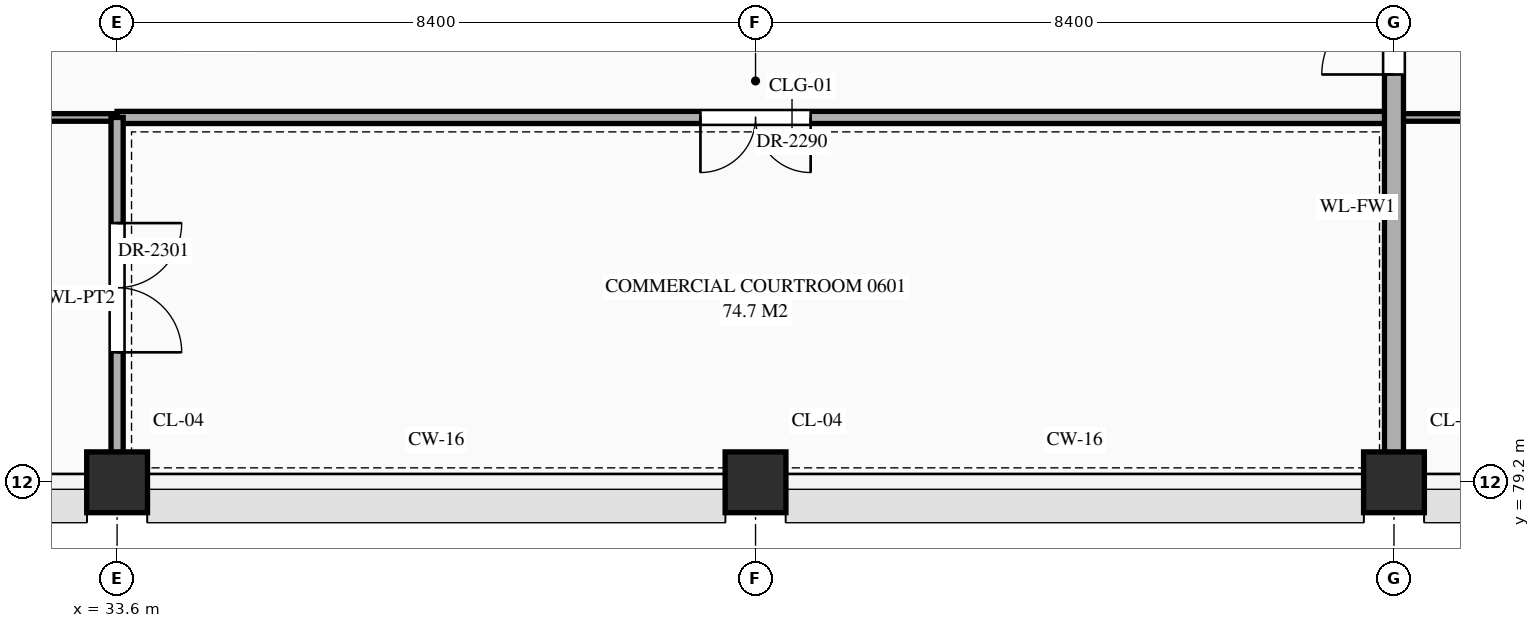
"""IFC4 building model, lengths in metres.
Left out: names, types, materials, properties, quantities, classifications, styles, units other than length and angle.
Written with IfcOpenShell. Run it as: python <this file> out.ifc"""

import sys

from ifc_helpers import new_model, si_unit, direction, frame, frame_2d, origin, origin_2d, place, context, subcontext, project, spatial, rectangle, extrude, element, fill, save


model = new_model("IFC4")
c1 = context("Model", 3, precision=1e-05, world=origin(), true_north=direction((0.0, 1.0)))
c2 = subcontext(c1, "Body", "Model", "MODEL_VIEW")
j1 = project(units=[si_unit("LENGTHUNIT", "METRE"), si_unit("PLANEANGLEUNIT", "RADIAN")], contexts=[c1])
p1 = place(None, origin())
s1 = spatial("IfcSite", under=j1, at=p1, CompositionType="ELEMENT")
p2 = place(p1, origin())
s2 = spatial("IfcBuilding", under=s1, at=p2, CompositionType="ELEMENT")
p3 = place(p2, frame((0.0, 0.0, 26.1)))
s3 = spatial("IfcBuildingStorey", under=s2, at=p3, CompositionType="ELEMENT", Elevation=26.1)
for number, where, z_axis, x_axis in (
    (1, (33.6, 79.2, 0.0), (0.0, 0.0, 1.0), (1.0, 0.0, 0.0)),
    (2, (42.0, 79.2, 0.0), (0.0, 0.0, 1.0), (1.0, 0.0, 0.0)),
    (3, (50.4, 79.2, 0.0), (0.0, 0.0, 1.0), (1.0, 0.0, 0.0)),
):
    element("IfcColumn", number, at=place(p3, frame(where, z_axis=z_axis, x_axis=x_axis)), inside=s3, PredefinedType="COLUMN", context=c2, shape_type="SweptSolid", body=[
        extrude(rectangle(XDim=0.8, YDim=0.8, at=origin_2d()), origin(), (0.0, 0.0, 1.0), 4.5),
    ])
p4 = place(p3, frame((25.24, 84.0, 0.0), z_axis=(0.0, 0.0, 1.0), x_axis=(1.0, 0.0, 0.0)))
e4 = element("IfcWall", 4, at=p4, inside=s3, PredefinedType="STANDARD", context=c2, shape_type="SweptSolid", body=[
    extrude(rectangle(XDim=8.36, YDim=0.1, at=frame_2d((4.18, 0.0))), origin(), (0.0, 0.0, 1.0), 4.24),
])
p5 = place(p4, frame((3.33, 0.0, 0.0)))
e5 = element("IfcOpeningElement", 5, at=p5, cuts=e4, PredefinedType="OPENING", context=c2, shape_type="SweptSolid", body=[
    extrude(rectangle(XDim=1.7, YDim=2.45, at=frame_2d((0.85, 1.225))), frame((0.0, 0.062, 0.0), z_axis=(0.0, -1.0, 0.0), x_axis=(1.0, 0.0, 0.0)), (0.0, 0.0, 1.0), 0.124),
])
p6 = place(p3, frame((33.6, 84.0, 0.0), z_axis=(0.0, 0.0, 1.0), x_axis=(1.0, 0.0, 0.0)))
e6 = element("IfcWall", 6, at=p6, inside=s3, PredefinedType="STANDARD", context=c2, shape_type="SweptSolid", body=[
    extrude(rectangle(XDim=16.8, YDim=0.16, at=frame_2d((8.4, 0.0))), origin(), (0.0, 0.0, 1.0), 4.24),
])
p7 = place(p6, frame((7.675, 0.0, 0.0)))
e7 = element("IfcOpeningElement", 7, at=p7, cuts=e6, PredefinedType="OPENING", context=c2, shape_type="SweptSolid", body=[
    extrude(rectangle(XDim=1.45, YDim=2.3, at=frame_2d((0.725, 1.15))), frame((0.0, 0.092, 0.0), z_axis=(0.0, -1.0, 0.0), x_axis=(1.0, 0.0, 0.0)), (0.0, 0.0, 1.0), 0.184),
])
p8 = place(p3, frame((50.4, 84.0, 0.0), z_axis=(0.0, 0.0, 1.0), x_axis=(1.0, 0.0, 0.0)))
e8 = element("IfcWall", 8, at=p8, inside=s3, PredefinedType="STANDARD", context=c2, shape_type="SweptSolid", body=[
    extrude(rectangle(XDim=16.8, YDim=0.1, at=frame_2d((8.4, 0.0))), origin(), (0.0, 0.0, 1.0), 4.24),
])
p9 = place(p8, frame((3.72, 0.0, 0.0)))
e9 = element("IfcOpeningElement", 9, at=p9, cuts=e8, PredefinedType="OPENING", context=c2, shape_type="SweptSolid", body=[
    extrude(rectangle(XDim=0.96, YDim=2.2, at=frame_2d((0.48, 1.1))), frame((0.0, 0.062, 0.0), z_axis=(0.0, -1.0, 0.0), x_axis=(1.0, 0.0, 0.0)), (0.0, 0.0, 1.0), 0.124),
])
p10 = place(p8, frame((12.1, 0.0, 0.0)))
e10 = element("IfcOpeningElement", 10, at=p10, cuts=e8, PredefinedType="OPENING", context=c2, shape_type="SweptSolid", body=[
    extrude(rectangle(XDim=1.0, YDim=2.25, at=frame_2d((0.5, 1.125))), frame((0.0, 0.062, 0.0), z_axis=(0.0, -1.0, 0.0), x_axis=(1.0, 0.0, 0.0)), (0.0, 0.0, 1.0), 0.124),
])
p11 = place(p3, frame((33.6, 79.24, 0.0), z_axis=(0.0, 0.0, 1.0), x_axis=(0.0, 1.0, 0.0)))
e11 = element("IfcWall", 11, at=p11, inside=s3, PredefinedType="STANDARD", context=c2, shape_type="SweptSolid", body=[
    extrude(rectangle(XDim=4.76, YDim=0.16, at=frame_2d((2.38, 0.0))), origin(), (0.0, 0.0, 1.0), 4.24),
])
p12 = place(p11, frame((1.67, 0.0, 0.0)))
e12 = element("IfcOpeningElement", 12, at=p12, cuts=e11, PredefinedType="OPENING", context=c2, shape_type="SweptSolid", body=[
    extrude(rectangle(XDim=1.7, YDim=2.45, at=frame_2d((0.85, 1.225))), frame((0.0, 0.092, 0.0), z_axis=(0.0, -1.0, 0.0), x_axis=(1.0, 0.0, 0.0)), (0.0, 0.0, 1.0), 0.184),
])
p13 = place(p3, frame((50.4, 79.24, 0.0), z_axis=(0.0, 0.0, 1.0), x_axis=(0.0, 1.0, 0.0)))
e13 = element("IfcWall", 13, at=p13, inside=s3, PredefinedType="STANDARD", context=c2, shape_type="SweptSolid", body=[
    extrude(rectangle(XDim=7.16, YDim=0.25, at=frame_2d((3.58, 0.0))), origin(), (0.0, 0.0, 1.0), 3.49),
])
p14 = place(p13, frame((5.325, 0.0, 0.0)))
e14 = element("IfcOpeningElement", 14, at=p14, cuts=e13, PredefinedType="OPENING", context=c2, shape_type="SweptSolid", body=[
    extrude(rectangle(XDim=0.95, YDim=2.15, at=frame_2d((0.475, 1.075))), frame((0.0, 0.137, 0.0), z_axis=(0.0, -1.0, 0.0), x_axis=(1.0, 0.0, 0.0)), (0.0, 0.0, 1.0), 0.274),
])
p15 = place(p14, origin())
e15 = element("IfcDoor", 15, at=p15, inside=s3, OperationType="SINGLE_SWING_LEFT", PredefinedType="DOOR", context=c2, shape_type="SweptSolid", body=[
    extrude(rectangle(XDim=0.95, YDim=2.15, at=frame_2d((0.475, 1.075))), frame((0.0, 0.025, 0.0), z_axis=(0.0, -1.0, 0.0), x_axis=(1.0, 0.0, 0.0)), (0.0, 0.0, 1.0), 0.05),
])
fill(e14, e15)
p16 = place(p7, frame((1.45, 0.0, 0.0), z_axis=(0.0, 0.0, 1.0), x_axis=(-1.0, 0.0, 0.0)))
e16 = element("IfcDoor", 16, at=p16, inside=s3, OperationType="DOUBLE_DOOR_SINGLE_SWING", PredefinedType="DOOR", context=c2, shape_type="SweptSolid", body=[
    extrude(rectangle(XDim=1.45, YDim=2.3, at=frame_2d((0.725, 1.15))), frame((0.0, 0.025, 0.0), z_axis=(0.0, -1.0, 0.0), x_axis=(1.0, 0.0, 0.0)), (0.0, 0.0, 1.0), 0.05),
])
fill(e7, e16)
p17 = place(p12, frame((1.7, 0.0, 0.0), z_axis=(0.0, 0.0, 1.0), x_axis=(-1.0, 0.0, 0.0)))
e17 = element("IfcDoor", 17, at=p17, inside=s3, OperationType="DOUBLE_DOOR_SINGLE_SWING", PredefinedType="DOOR", context=c2, shape_type="SweptSolid", body=[
    extrude(rectangle(XDim=1.7, YDim=2.45, at=frame_2d((0.85, 1.225))), frame((0.0, 0.025, 0.0), z_axis=(0.0, -1.0, 0.0), x_axis=(1.0, 0.0, 0.0)), (0.0, 0.0, 1.0), 0.05),
])
fill(e12, e17)
save(model, sys.argv[1])
